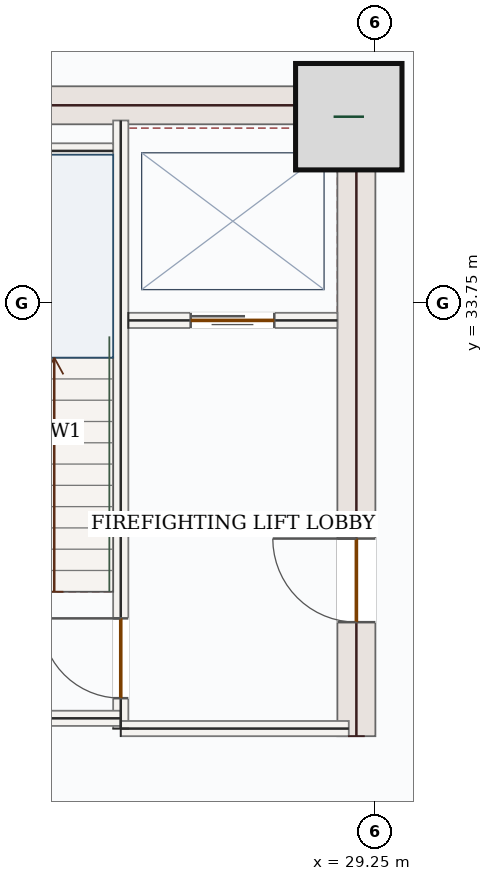
"""IFC4 building model, lengths in metres.
Left out: names, types, materials, properties, quantities, classifications, styles, units other than length and angle.
Written with IfcOpenShell. Run it as: python <this file> out.ifc"""

import sys

from ifc_helpers import new_model, si_unit, direction, frame, frame_2d, origin, origin_2d, place, context, subcontext, project, spatial, rectangle, extrude, source, transform, mapped, element, fill, save


model = new_model("IFC4")
c1 = context("Model", 3, precision=1e-05, world=origin(), true_north=direction((0.0, 1.0)))
c2 = subcontext(c1, "Body", "Model", "MODEL_VIEW")
j1 = project(units=[si_unit("LENGTHUNIT", "METRE"), si_unit("PLANEANGLEUNIT", "RADIAN")], contexts=[c1])
p1 = place(None, origin())
s1 = spatial("IfcSite", under=j1, at=p1, CompositionType="ELEMENT")
p2 = place(p1, origin())
s2 = spatial("IfcBuilding", under=s1, at=p2, CompositionType="ELEMENT")
p3 = place(p2, frame((0.0, 0.0, 113.1)))
s3 = spatial("IfcBuildingStorey", under=s2, at=p3, CompositionType="ELEMENT", Elevation=113.1)
p4 = place(p3, frame((29.0, 28.05, 0.0), z_axis=(0.0, 0.0, 1.0), x_axis=(0.0, 1.0, 0.0)))
e1 = element("IfcWall", 1, at=p4, inside=s3, PredefinedType="SHEAR", context=c2, shape_type="SweptSolid", body=[
    extrude(rectangle(XDim=8.55, YDim=0.5, at=frame_2d((4.275, 0.0))), origin(), (0.0, 0.0, 1.0), 3.95),
])
p5 = place(p4, frame((1.5, 0.0, 0.0)))
e2 = element("IfcOpeningElement", 2, at=p5, cuts=e1, PredefinedType="OPENING", context=c2, shape_type="SweptSolid", body=[
    extrude(rectangle(XDim=1.1, YDim=2.2, at=frame_2d((0.55, 1.1))), frame((0.0, 0.26, 0.0), z_axis=(0.0, -1.0, 0.0), x_axis=(1.0, 0.0, 0.0)), (0.0, 0.0, 1.0), 0.52),
])
m1 = source(origin(), c2, "Body", "SweptSolid", [
    extrude(rectangle(XDim=7.0, YDim=0.5, at=frame_2d((3.5, 0.0))), origin(), (0.0, 0.0, 1.0), 3.95),
])
p6 = place(p3, frame((21.75, 36.35, 0.0), z_axis=(0.0, 0.0, 1.0), x_axis=(1.0, 0.0, 0.0)))
e3 = element("IfcWall", 3, at=p6, inside=s3, PredefinedType="SHEAR", context=c2, shape_type="MappedRepresentation", body=[
    mapped(m1, transform((0.0, 0.0, 0.0), x_axis=(1.0, 0.0, 0.0), y_axis=(0.0, 1.0, 0.0), z_axis=(0.0, 0.0, 1.0), scale=1.0)),
])
m2 = source(origin(), c2, "Body", "SweptSolid", [
    extrude(rectangle(XDim=1.4, YDim=1.4, at=origin_2d()), origin(), (0.0, 0.0, 1.0), 4.2),
])
p7 = place(p3, frame((28.9, 36.2, 0.0), z_axis=(0.0, 0.0, 1.0), x_axis=(1.0, 0.0, 0.0)))
e4 = element("IfcColumn", 4, at=p7, inside=s3, PredefinedType="COLUMN", context=c2, shape_type="MappedRepresentation", body=[
    mapped(m2, transform((0.0, 0.0, 0.0), x_axis=(1.0, 0.0, 0.0), y_axis=(0.0, 1.0, 0.0), z_axis=(0.0, 0.0, 1.0), scale=1.0)),
])
p8 = place(p3, frame((25.9, 28.15, 0.0), z_axis=(0.0, 0.0, 1.0), x_axis=(0.0, 1.0, 0.0)))
e5 = element("IfcWall", 5, at=p8, inside=s3, PredefinedType="SOLIDWALL", context=c2, shape_type="SweptSolid", body=[
    extrude(rectangle(XDim=8.0, YDim=0.2, at=frame_2d((4.0, 0.0))), origin(), (0.0, 0.0, 1.0), 3.95),
])
p9 = place(p8, frame((0.4, 0.0, 0.0)))
e6 = element("IfcOpeningElement", 6, at=p9, cuts=e5, PredefinedType="OPENING", context=c2, shape_type="SweptSolid", body=[
    extrude(rectangle(XDim=1.05, YDim=2.15, at=frame_2d((0.525, 1.075))), frame((0.0, 0.11, 0.0), z_axis=(0.0, -1.0, 0.0), x_axis=(1.0, 0.0, 0.0)), (0.0, 0.0, 1.0), 0.22),
])
m3 = source(origin(), c2, "Body", "SweptSolid", [
    extrude(rectangle(XDim=4.25, YDim=0.2, at=frame_2d((2.125, 0.0))), origin(), (0.0, 0.0, 1.0), 3.95),
])
p10 = place(p3, frame((21.65, 28.285, 0.0), z_axis=(0.0, 0.0, 1.0), x_axis=(1.0, 0.0, 0.0)))
e7 = element("IfcWall", 7, at=p10, inside=s3, PredefinedType="SOLIDWALL", context=c2, shape_type="MappedRepresentation", body=[
    mapped(m3, transform((0.0, 0.0, 0.0), x_axis=(1.0, 0.0, 0.0), y_axis=(0.0, 1.0, 0.0), z_axis=(0.0, 0.0, 1.0), scale=1.0)),
])
m4 = source(origin(), c2, "Body", "SweptSolid", [
    extrude(rectangle(XDim=3.0, YDim=0.2, at=frame_2d((1.5, 0.0))), origin(), (0.0, 0.0, 1.0), 3.95),
])
p11 = place(p3, frame((25.9, 28.15, 0.0), z_axis=(0.0, 0.0, 1.0), x_axis=(1.0, 0.0, 0.0)))
e8 = element("IfcWall", 8, at=p11, inside=s3, PredefinedType="SOLIDWALL", context=c2, shape_type="MappedRepresentation", body=[
    mapped(m4, transform((0.0, 0.0, 0.0), x_axis=(1.0, 0.0, 0.0), y_axis=(0.0, 1.0, 0.0), z_axis=(0.0, 0.0, 1.0), scale=1.0)),
])
m5 = source(origin(), c2, "Body", "SweptSolid", [
    extrude(rectangle(XDim=3.25, YDim=0.2, at=frame_2d((1.625, 0.0))), origin(), (0.0, 0.0, 1.0), 3.95),
])
p12 = place(p3, frame((22.55, 35.75, 0.0), z_axis=(0.0, 0.0, 1.0), x_axis=(1.0, 0.0, 0.0)))
e9 = element("IfcWall", 9, at=p12, inside=s3, PredefinedType="SOLIDWALL", context=c2, shape_type="MappedRepresentation", body=[
    mapped(m5, transform((0.0, 0.0, 0.0), x_axis=(1.0, 0.0, 0.0), y_axis=(0.0, 1.0, 0.0), z_axis=(0.0, 0.0, 1.0), scale=1.0)),
])
p13 = place(p3, frame((26.0, 33.52, 0.0), z_axis=(0.0, 0.0, 1.0), x_axis=(1.0, 0.0, 0.0)))
e10 = element("IfcWall", 10, at=p13, inside=s3, PredefinedType="SOLIDWALL", context=c2, shape_type="SweptSolid", body=[
    extrude(rectangle(XDim=2.75, YDim=0.2, at=frame_2d((1.375, 0.0))), origin(), (0.0, 0.0, 1.0), 3.95),
])
p14 = place(p13, frame((0.82, 0.0, 0.0)))
e11 = element("IfcOpeningElement", 11, at=p14, cuts=e10, PredefinedType="OPENING", context=c2, shape_type="SweptSolid", body=[
    extrude(rectangle(XDim=1.1, YDim=2.15, at=frame_2d((0.55, 1.075))), frame((0.0, 0.11, 0.0), z_axis=(0.0, -1.0, 0.0), x_axis=(1.0, 0.0, 0.0)), (0.0, 0.0, 1.0), 0.22),
])
m6 = source(origin(), c2, "Body", "SweptSolid", [
    extrude(rectangle(XDim=1.05, YDim=2.15, at=frame_2d((0.525, 1.075))), frame((0.0, 0.025, 0.0), z_axis=(0.0, -1.0, 0.0), x_axis=(1.0, 0.0, 0.0)), (0.0, 0.0, 1.0), 0.05),
])
p15 = place(p9, origin())
e12 = element("IfcDoor", 12, at=p15, inside=s3, OperationType="SINGLE_SWING_RIGHT", PredefinedType="DOOR", context=c2, shape_type="MappedRepresentation", body=[
    mapped(m6, transform((0.0, 0.0, 0.0), x_axis=(1.0, 0.0, 0.0), y_axis=(0.0, 1.0, 0.0), z_axis=(0.0, 0.0, 1.0), scale=1.0)),
])
fill(e6, e12)
m7 = source(origin(), c2, "Body", "SweptSolid", [
    extrude(rectangle(XDim=1.1, YDim=2.15, at=frame_2d((0.55, 1.075))), frame((0.0, 0.025, 0.0), z_axis=(0.0, -1.0, 0.0), x_axis=(1.0, 0.0, 0.0)), (0.0, 0.0, 1.0), 0.05),
])
p16 = place(p14, origin())
e13 = element("IfcDoor", 13, at=p16, inside=s3, OperationType="DOUBLE_DOOR_SLIDING", PredefinedType="DOOR", context=c2, shape_type="MappedRepresentation", body=[
    mapped(m7, transform((0.0, 0.0, 0.0), x_axis=(1.0, 0.0, 0.0), y_axis=(0.0, 1.0, 0.0), z_axis=(0.0, 0.0, 1.0), scale=1.0)),
])
fill(e11, e13)
m8 = source(origin(), c2, "Body", "SweptSolid", [
    extrude(rectangle(XDim=1.1, YDim=2.2, at=frame_2d((0.55, 1.1))), frame((0.0, 0.025, 0.0), z_axis=(0.0, -1.0, 0.0), x_axis=(1.0, 0.0, 0.0)), (0.0, 0.0, 1.0), 0.05),
])
p17 = place(p5, origin())
e14 = element("IfcDoor", 14, at=p17, inside=s3, OperationType="SINGLE_SWING_RIGHT", PredefinedType="DOOR", context=c2, shape_type="MappedRepresentation", body=[
    mapped(m8, transform((0.0, 0.0, 0.0), x_axis=(1.0, 0.0, 0.0), y_axis=(0.0, 1.0, 0.0), z_axis=(0.0, 0.0, 1.0), scale=1.0)),
])
fill(e2, e14)
save(model, sys.argv[1])
